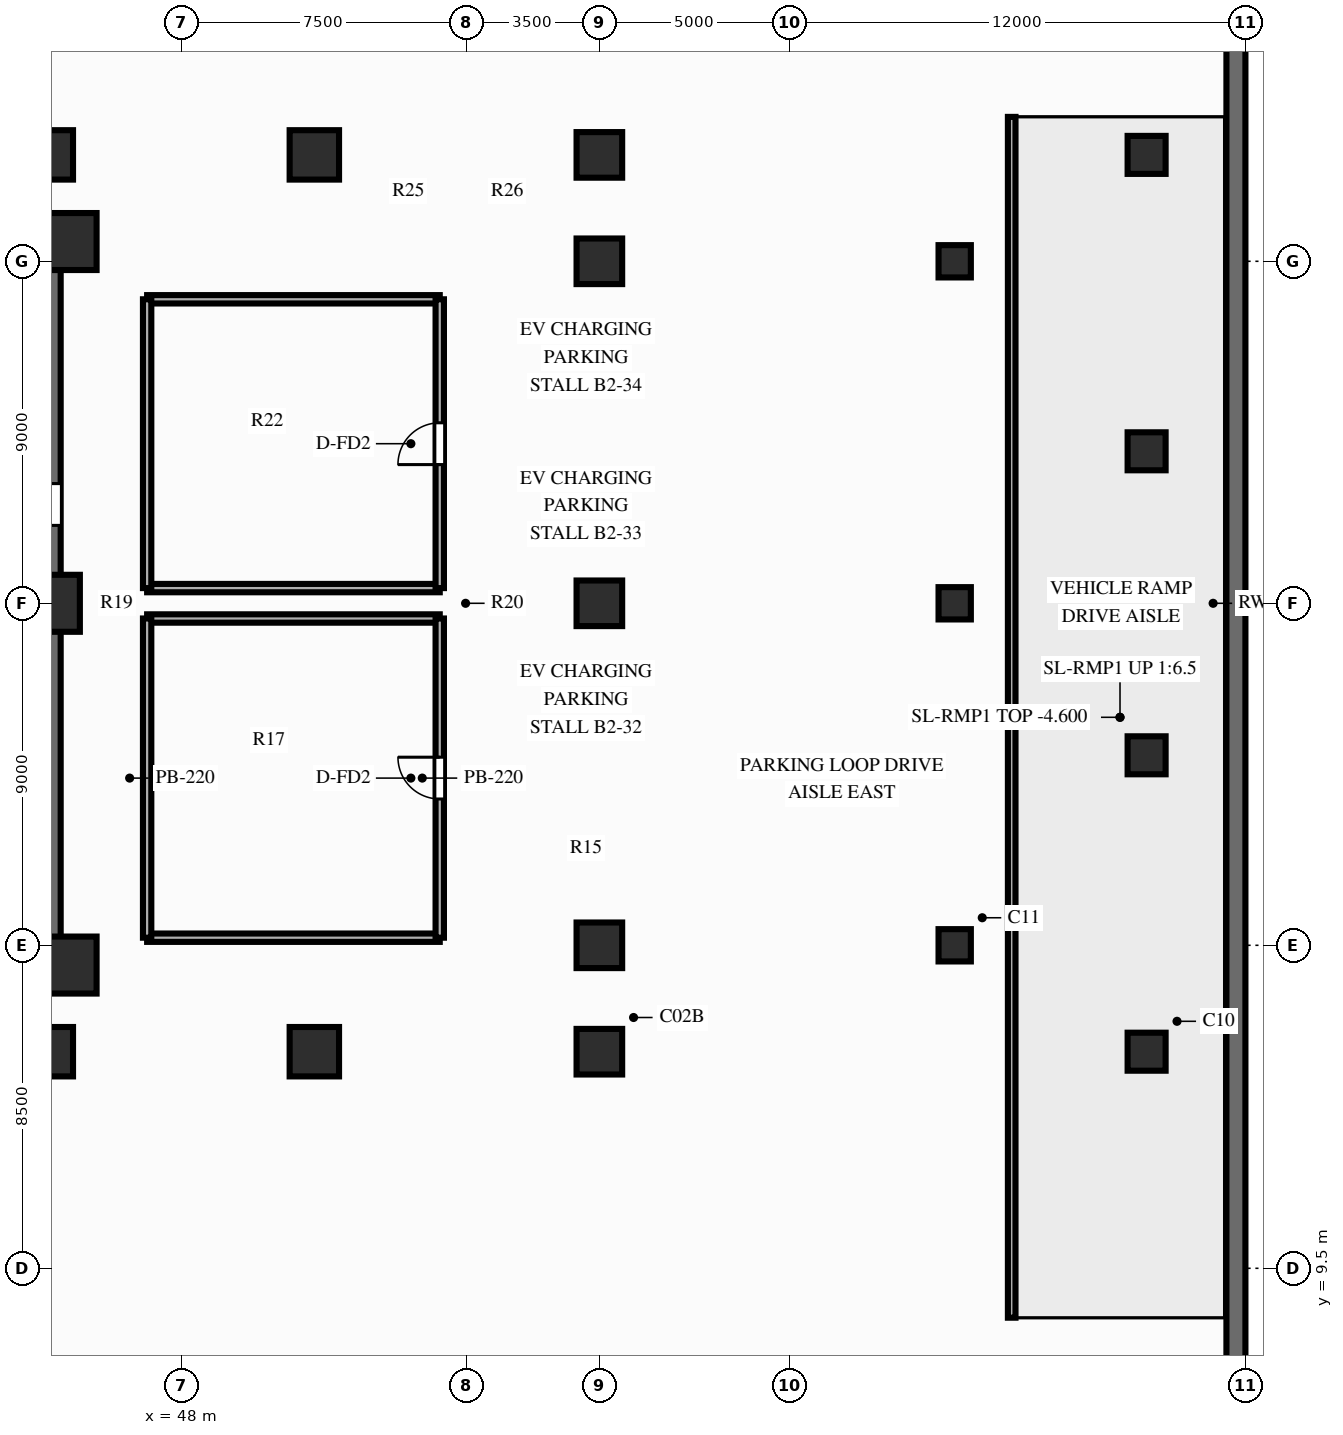
"""IFC4 building model, lengths in metres.
Left out: names, types, materials, properties, quantities, classifications, styles, units other than length and angle.
Written with IfcOpenShell. Run it as: python <this file> out.ifc"""

import sys

from ifc_helpers import new_model, si_unit, direction, frame, frame_2d, origin, origin_2d, place, context, subcontext, project, spatial, rectangle, circle, extrude, source, transform, mapped, element, fill, save


model = new_model("IFC4")
c1 = context("Model", 3, precision=1e-05, world=origin(), true_north=direction((0.0, 1.0)))
c2 = subcontext(c1, "Body", "Model", "MODEL_VIEW")
j1 = project(units=[si_unit("LENGTHUNIT", "METRE"), si_unit("PLANEANGLEUNIT", "RADIAN")], contexts=[c1])
p1 = place(None, origin())
s1 = spatial("IfcSite", under=j1, at=p1, CompositionType="ELEMENT")
p2 = place(p1, origin())
s2 = spatial("IfcBuilding", under=s1, at=p2, CompositionType="ELEMENT")
p3 = place(p2, frame((0.0, 0.0, -9.2)))
s3 = spatial("IfcBuildingStorey", under=s2, at=p3, CompositionType="ELEMENT", Elevation=-9.2)
p4 = place(p3, frame((75.75, 0.5, 0.0), z_axis=(0.0, 0.0, 1.0), x_axis=(0.0, 1.0, 0.0)))
e1 = element("IfcWall", 1, at=p4, inside=s3, PredefinedType="USERDEFINED", context=c2, shape_type="SweptSolid", body=[
    extrude(rectangle(XDim=53.0, YDim=0.5, at=frame_2d((26.5, 0.0))), origin(), (0.0, 0.0, 1.0), 4.6),
])
p5 = place(p3, frame((44.5, 17.48, 0.0), z_axis=(0.0, 0.0, 1.0), x_axis=(0.0, 1.0, 0.0)))
e2 = element("IfcWall", 2, at=p5, inside=s3, PredefinedType="SHEAR", context=c2, shape_type="SweptSolid", body=[
    extrude(rectangle(XDim=19.04, YDim=0.65, at=frame_2d((9.52, 0.0))), origin(), (0.0, 0.0, 1.0), 4.6),
])
p6 = place(p5, frame((12.67, 0.0, 0.0), z_axis=(0.0, 0.0, 1.0), x_axis=(-1.0, 0.0, 0.0)))
e3 = element("IfcOpeningElement", 3, at=p6, cuts=e2, PredefinedType="OPENING", context=c2, shape_type="SweptSolid", body=[
    extrude(rectangle(XDim=1.1, YDim=2.15, at=frame_2d((0.55, 1.075))), frame((0.0, 0.337, 0.0), z_axis=(0.0, -1.0, 0.0), x_axis=(1.0, 0.0, 0.0)), (0.0, 0.0, 1.0), 0.674),
])
m1 = source(origin(), c2, "Body", "SweptSolid", [
    extrude(rectangle(XDim=1.5, YDim=1.5, at=origin_2d()), origin(), (0.0, 0.0, 1.0), 4.6),
])
for number, where, z_axis, x_axis in (
    (4, (45.02, 17.48, 0.0), (0.0, 0.0, 1.0), (1.0, 0.0, 0.0)),
    (5, (45.02, 36.52, 0.0), (0.0, 0.0, 1.0), (1.0, 0.0, 0.0)),
    (6, (44.58, 27.0, 0.0), (0.0, 0.0, 1.0), (1.0, 0.0, 0.0)),
):
    element("IfcColumn", number, at=place(p3, frame(where, z_axis=z_axis, x_axis=x_axis)), inside=s3, PredefinedType="COLUMN", context=c2, shape_type="MappedRepresentation", body=[
        mapped(m1, transform((0.0, 0.0, 0.0), scale=1.0)),
    ])
m2 = source(origin(), c2, "Body", "SweptSolid", [
    extrude(circle(Radius=0.5, at=origin_2d()), origin(), (0.0, 0.0, 1.0), 4.6),
])
for number, where, z_axis, x_axis in (
    (7, (73.4, 15.2, 0.0), (0.0, 0.0, 1.0), (1.0, 0.0, 0.0)),
    (8, (73.4, 23.0, 0.0), (0.0, 0.0, 1.0), (1.0, 0.0, 0.0)),
    (9, (73.4, 31.0, 0.0), (0.0, 0.0, 1.0), (1.0, 0.0, 0.0)),
    (10, (73.4, 38.8, 0.0), (0.0, 0.0, 1.0), (1.0, 0.0, 0.0)),
):
    element("IfcColumn", number, at=place(p3, frame(where, z_axis=z_axis, x_axis=x_axis)), inside=s3, PredefinedType="COLUMN", context=c2, shape_type="MappedRepresentation", body=[
        mapped(m2, transform((0.0, 0.0, 0.0), scale=1.0)),
    ])
m3 = source(origin(), c2, "Body", "SweptSolid", [
    extrude(circle(Radius=0.425, at=origin_2d()), origin(), (0.0, 0.0, 1.0), 4.6),
])
for number, where, z_axis, x_axis in (
    (11, (68.35, 18.0, 0.0), (0.0, 0.0, 1.0), (1.0, 0.0, 0.0)),
    (12, (68.35, 27.0, 0.0), (0.0, 0.0, 1.0), (1.0, 0.0, 0.0)),
    (13, (68.35, 36.0, 0.0), (0.0, 0.0, 1.0), (1.0, 0.0, 0.0)),
):
    element("IfcColumn", number, at=place(p3, frame(where, z_axis=z_axis, x_axis=x_axis)), inside=s3, PredefinedType="COLUMN", context=c2, shape_type="MappedRepresentation", body=[
        mapped(m3, transform((0.0, 0.0, 0.0), scale=1.0)),
    ])
m4 = source(origin(), c2, "Body", "SweptSolid", [
    extrude(rectangle(XDim=1.2, YDim=1.2, at=origin_2d()), origin(), (0.0, 0.0, 1.0), 4.6),
])
for number, where, z_axis, x_axis in (
    (14, (59.0, 15.2, 0.0), (0.0, 0.0, 1.0), (1.0, 0.0, 0.0)),
    (15, (59.0, 18.0, 0.0), (0.0, 0.0, 1.0), (1.0, 0.0, 0.0)),
    (16, (59.0, 27.0, 0.0), (0.0, 0.0, 1.0), (1.0, 0.0, 0.0)),
    (17, (59.0, 36.0, 0.0), (0.0, 0.0, 1.0), (1.0, 0.0, 0.0)),
    (18, (59.0, 38.8, 0.0), (0.0, 0.0, 1.0), (1.0, 0.0, 0.0)),
):
    element("IfcColumn", number, at=place(p3, frame(where, z_axis=z_axis, x_axis=x_axis)), inside=s3, PredefinedType="COLUMN", context=c2, shape_type="MappedRepresentation", body=[
        mapped(m4, transform((0.0, 0.0, 0.0), scale=1.0)),
    ])
m5 = source(origin(), c2, "Body", "SweptSolid", [
    extrude(rectangle(XDim=1.3, YDim=1.3, at=origin_2d()), origin(), (0.0, 0.0, 1.0), 4.6),
])
for number, where, z_axis, x_axis in (
    (19, (44.5, 15.2, 0.0), (0.0, 0.0, 1.0), (1.0, 0.0, 0.0)),
    (20, (44.5, 38.8, 0.0), (0.0, 0.0, 1.0), (1.0, 0.0, 0.0)),
    (21, (51.5, 15.2, 0.0), (0.0, 0.0, 1.0), (1.0, 0.0, 0.0)),
    (22, (51.5, 38.8, 0.0), (0.0, 0.0, 1.0), (1.0, 0.0, 0.0)),
):
    element("IfcColumn", number, at=place(p3, frame(where, z_axis=z_axis, x_axis=x_axis)), inside=s3, PredefinedType="COLUMN", context=c2, shape_type="MappedRepresentation", body=[
        mapped(m5, transform((0.0, 0.0, 0.0), scale=1.0)),
    ])
p7 = place(p3, frame((69.85, 8.2, 0.0), z_axis=(0.0, 0.0, 1.0), x_axis=(0.0, 1.0, 0.0)))
e23 = element("IfcWall", 23, at=p7, inside=s3, PredefinedType="PARTITIONING", context=c2, shape_type="SweptSolid", body=[
    extrude(rectangle(XDim=31.6, YDim=0.2, at=frame_2d((15.8, 0.0))), origin(), (0.0, 0.0, 1.0), 4.3),
])
for number, where, z_axis, x_axis in (
    (24, (47.1, 18.2, 0.0), (0.0, 0.0, 1.0), (1.0, 0.0, 0.0)),
    (25, (47.1, 26.6, 0.0), (0.0, 0.0, 1.0), (1.0, 0.0, 0.0)),
):
    element("IfcWall", number, at=place(p3, frame(where, z_axis=z_axis, x_axis=x_axis)), inside=s3, PredefinedType="PARTITIONING", context=c2, shape_type="SweptSolid", body=[
        extrude(rectangle(XDim=7.7, YDim=0.22, at=frame_2d((3.85, 0.0))), origin(), (0.0, 0.0, 1.0), 4.3),
    ])
p8 = place(p3, frame((47.1, 18.2, 0.0), z_axis=(0.0, 0.0, 1.0), x_axis=(0.0, 1.0, 0.0)))
e26 = element("IfcWall", 26, at=p8, inside=s3, PredefinedType="PARTITIONING", context=c2, shape_type="SweptSolid", body=[
    extrude(rectangle(XDim=8.4, YDim=0.22, at=frame_2d((4.2, 0.0))), origin(), (0.0, 0.0, 1.0), 4.3),
])
p9 = place(p3, frame((54.8, 18.2, 0.0), z_axis=(0.0, 0.0, 1.0), x_axis=(0.0, 1.0, 0.0)))
e27 = element("IfcWall", 27, at=p9, inside=s3, PredefinedType="PARTITIONING", context=c2, shape_type="SweptSolid", body=[
    extrude(rectangle(XDim=8.4, YDim=0.22, at=frame_2d((4.2, 0.0))), origin(), (0.0, 0.0, 1.0), 4.3),
])
p10 = place(p9, frame((3.65, 0.0, 0.0)))
e28 = element("IfcOpeningElement", 28, at=p10, cuts=e27, PredefinedType="OPENING", context=c2, shape_type="SweptSolid", body=[
    extrude(rectangle(XDim=1.1, YDim=2.15, at=frame_2d((0.55, 1.075))), frame((0.0, 0.122, 0.0), z_axis=(0.0, -1.0, 0.0), x_axis=(1.0, 0.0, 0.0)), (0.0, 0.0, 1.0), 0.244),
])
for number, where, z_axis, x_axis in (
    (29, (47.1, 27.4, 0.0), (0.0, 0.0, 1.0), (1.0, 0.0, 0.0)),
    (30, (47.1, 35.0, 0.0), (0.0, 0.0, 1.0), (1.0, 0.0, 0.0)),
):
    element("IfcWall", number, at=place(p3, frame(where, z_axis=z_axis, x_axis=x_axis)), inside=s3, PredefinedType="PARTITIONING", context=c2, shape_type="SweptSolid", body=[
        extrude(rectangle(XDim=7.7, YDim=0.22, at=frame_2d((3.85, 0.0))), origin(), (0.0, 0.0, 1.0), 4.3),
    ])
p11 = place(p3, frame((47.1, 27.4, 0.0), z_axis=(0.0, 0.0, 1.0), x_axis=(0.0, 1.0, 0.0)))
e31 = element("IfcWall", 31, at=p11, inside=s3, PredefinedType="PARTITIONING", context=c2, shape_type="SweptSolid", body=[
    extrude(rectangle(XDim=7.6, YDim=0.22, at=frame_2d((3.8, 0.0))), origin(), (0.0, 0.0, 1.0), 4.3),
])
p12 = place(p3, frame((54.8, 27.4, 0.0), z_axis=(0.0, 0.0, 1.0), x_axis=(0.0, 1.0, 0.0)))
e32 = element("IfcWall", 32, at=p12, inside=s3, PredefinedType="PARTITIONING", context=c2, shape_type="SweptSolid", body=[
    extrude(rectangle(XDim=7.6, YDim=0.22, at=frame_2d((3.8, 0.0))), origin(), (0.0, 0.0, 1.0), 4.3),
])
p13 = place(p12, frame((3.25, 0.0, 0.0)))
e33 = element("IfcOpeningElement", 33, at=p13, cuts=e32, PredefinedType="OPENING", context=c2, shape_type="SweptSolid", body=[
    extrude(rectangle(XDim=1.1, YDim=2.15, at=frame_2d((0.55, 1.075))), frame((0.0, 0.122, 0.0), z_axis=(0.0, -1.0, 0.0), x_axis=(1.0, 0.0, 0.0)), (0.0, 0.0, 1.0), 0.244),
])
m6 = source(origin(), c2, "Body", "SweptSolid", [
    extrude(rectangle(XDim=1.1, YDim=2.15, at=frame_2d((0.55, 1.075))), frame((0.0, 0.025, 0.0), z_axis=(0.0, -1.0, 0.0), x_axis=(1.0, 0.0, 0.0)), (0.0, 0.0, 1.0), 0.05),
])
p14 = place(p10, origin())
e34 = element("IfcDoor", 34, at=p14, inside=s3, OperationType="SINGLE_SWING_RIGHT", PredefinedType="DOOR", context=c2, shape_type="MappedRepresentation", body=[
    mapped(m6, transform((0.0, 0.0, 0.0), scale=1.0)),
])
fill(e28, e34)
p15 = place(p13, origin())
e35 = element("IfcDoor", 35, at=p15, inside=s3, OperationType="SINGLE_SWING_LEFT", PredefinedType="DOOR", context=c2, shape_type="MappedRepresentation", body=[
    mapped(m6, transform((0.0, 0.0, 0.0), scale=1.0)),
])
fill(e33, e35)
save(model, sys.argv[1])
